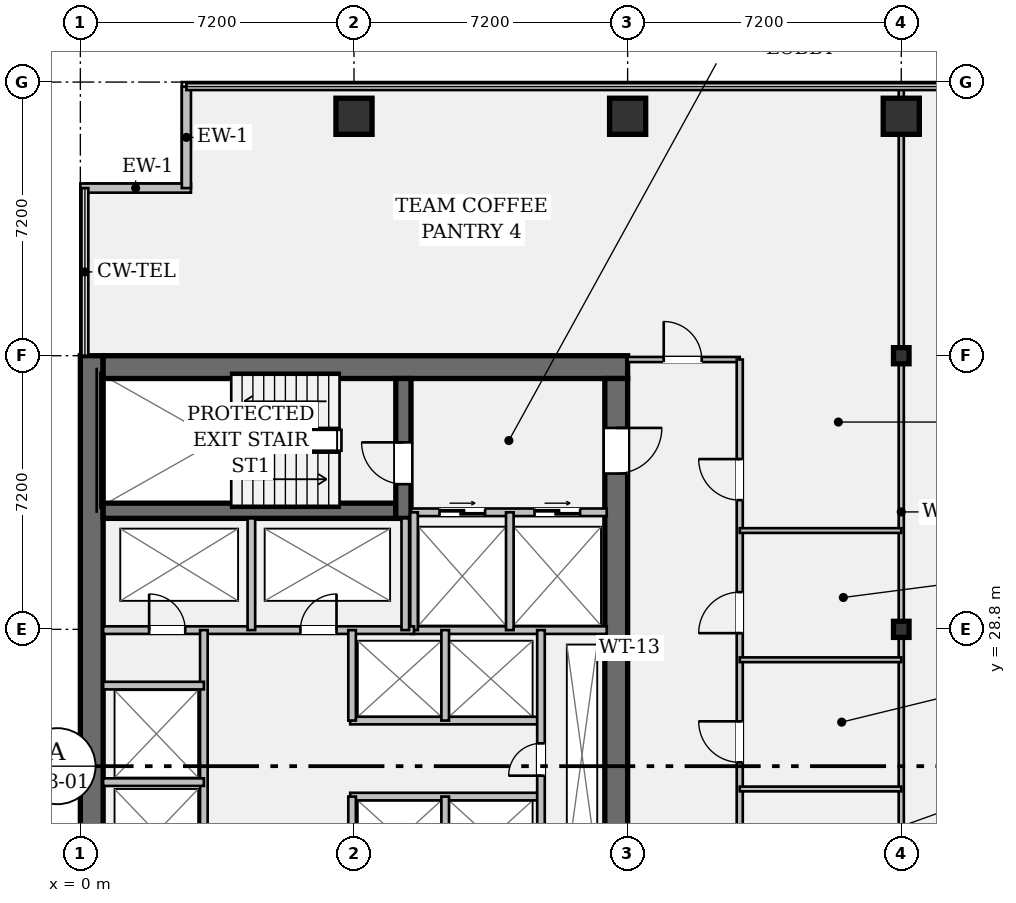
"""IFC4 building model, lengths in metres.
Left out: names, types, materials, properties, quantities, classifications, styles, units other than length and angle.
Written with IfcOpenShell. Run it as: python <this file> out.ifc"""

import sys

from ifc_helpers import new_model, si_unit, direction, frame, frame_2d, origin, origin_2d, place, context, subcontext, project, spatial, rectangle, hollow_rectangle, i_section, extrude, element, fill, save


model = new_model("IFC4")
c1 = context("Model", 3, precision=1e-05, world=origin(), true_north=direction((0.0, 1.0)))
c2 = subcontext(c1, "Body", "Model", "MODEL_VIEW")
j1 = project(units=[si_unit("LENGTHUNIT", "METRE"), si_unit("PLANEANGLEUNIT", "RADIAN")], contexts=[c1])
p1 = place(None, origin())
s1 = spatial("IfcSite", under=j1, at=p1, CompositionType="ELEMENT")
p2 = place(p1, origin())
s2 = spatial("IfcBuilding", under=s1, at=p2, CompositionType="ELEMENT")
p3 = place(p2, frame((0.0, 0.0, 102.2)))
s3 = spatial("IfcBuildingStorey", under=s2, at=p3, CompositionType="ELEMENT", Elevation=102.2)
p4 = place(p3, frame((0.3, 7.2, 0.0), z_axis=(0.0, 0.0, 1.0), x_axis=(0.0, 1.0, 0.0)))
e1 = element("IfcWall", 1, at=p4, inside=s3, PredefinedType="SHEAR", context=c2, shape_type="SweptSolid", body=[
    extrude(rectangle(XDim=28.8, YDim=0.6, at=frame_2d((14.4, 0.0))), origin(), (0.0, 0.0, 1.0), 3.58),
])
p5 = place(p3, frame((0.6, 35.7, 0.0), z_axis=(0.0, 0.0, 1.0), x_axis=(1.0, 0.0, 0.0)))
e2 = element("IfcWall", 2, at=p5, inside=s3, PredefinedType="SHEAR", context=c2, shape_type="SweptSolid", body=[
    extrude(rectangle(XDim=13.8, YDim=0.6, at=frame_2d((6.9, 0.0))), origin(), (0.0, 0.0, 1.0), 3.58),
])
p6 = place(p3, frame((14.1, 35.4, 0.0), z_axis=(0.0, 0.0, 1.0), x_axis=(0.0, -1.0, 0.0)))
e3 = element("IfcWall", 3, at=p6, inside=s3, PredefinedType="SHEAR", context=c2, shape_type="SweptSolid", body=[
    extrude(rectangle(XDim=27.6, YDim=0.6, at=frame_2d((13.8, 0.0))), origin(), (0.0, 0.0, 1.0), 3.58),
])
p7 = place(p6, frame((1.3, 0.0, 0.0)))
e4 = element("IfcOpeningElement", 4, at=p7, cuts=e3, PredefinedType="OPENING", context=c2, shape_type="SweptSolid", body=[
    extrude(rectangle(XDim=1.2, YDim=2.15, at=frame_2d((0.6, 1.075))), frame((0.0, 0.312, 0.0), z_axis=(0.0, -1.0, 0.0), x_axis=(1.0, 0.0, 0.0)), (0.0, 0.0, 1.0), 0.624),
])
p8 = place(p6, frame((25.25, 0.0, 0.0)))
e5 = element("IfcOpeningElement", 5, at=p8, cuts=e3, PredefinedType="OPENING", context=c2, shape_type="SweptSolid", body=[
    extrude(rectangle(XDim=1.2, YDim=2.15, at=frame_2d((0.6, 1.075))), frame((0.0, 0.312, 0.0), z_axis=(0.0, -1.0, 0.0), x_axis=(1.0, 0.0, 0.0)), (0.0, 0.0, 1.0), 0.624),
])
p9 = place(p6, frame((14.6, 0.0, 0.0)))
e6 = element("IfcOpeningElement", 6, at=p9, cuts=e3, PredefinedType="OPENING", context=c2, shape_type="SweptSolid", body=[
    extrude(rectangle(XDim=1.6, YDim=2.2, at=frame_2d((0.8, 1.1))), frame((0.0, 0.312, 0.0), z_axis=(0.0, -1.0, 0.0), x_axis=(1.0, 0.0, 0.0)), (0.0, 0.0, 1.0), 0.624),
])
p10 = place(p3, frame((0.6, 31.92, 0.0), z_axis=(0.0, 0.0, 1.0), x_axis=(1.0, 0.0, 0.0)))
e7 = element("IfcWall", 7, at=p10, inside=s3, PredefinedType="SHEAR", context=c2, shape_type="SweptSolid", body=[
    extrude(rectangle(XDim=7.7, YDim=0.4, at=frame_2d((3.85, 0.0))), origin(), (0.0, 0.0, 1.0), 3.58),
])
p11 = place(p3, frame((8.5, 31.72, 0.0), z_axis=(0.0, 0.0, 1.0), x_axis=(0.0, 1.0, 0.0)))
e8 = element("IfcWall", 8, at=p11, inside=s3, PredefinedType="SHEAR", context=c2, shape_type="SweptSolid", body=[
    extrude(rectangle(XDim=3.68, YDim=0.4, at=frame_2d((1.84, 0.0))), origin(), (0.0, 0.0, 1.0), 3.58),
])
p12 = place(p11, frame((0.9, 0.0, 0.0)))
e9 = element("IfcOpeningElement", 9, at=p12, cuts=e8, PredefinedType="OPENING", context=c2, shape_type="SweptSolid", body=[
    extrude(rectangle(XDim=1.1, YDim=2.15, at=frame_2d((0.55, 1.075))), frame((0.0, 0.212, 0.0), z_axis=(0.0, -1.0, 0.0), x_axis=(1.0, 0.0, 0.0)), (0.0, 0.0, 1.0), 0.424),
])
for number, where, z_axis, x_axis in (
    (10, (7.2, 42.3, 0.0), (0.0, 0.0, 1.0), (1.0, 0.0, 0.0)),
    (11, (14.4, 42.3, 0.0), (0.0, 0.0, 1.0), (1.0, 0.0, 0.0)),
):
    element("IfcColumn", number, at=place(p3, frame(where, z_axis=z_axis, x_axis=x_axis)), inside=s3, PredefinedType="COLUMN", context=c2, shape_type="SweptSolid", body=[
        extrude(hollow_rectangle(XDim=0.95, YDim=0.95, WallThickness=0.06, at=origin_2d()), origin(), (0.0, 0.0, 1.0), 3.58),
    ])
for number, where, z_axis, x_axis in (
    (12, (21.6, 28.8, 0.0), (0.0, 0.0, 1.0), (1.0, 0.0, 0.0)),
    (13, (21.6, 36.0, 0.0), (0.0, 0.0, 1.0), (1.0, 0.0, 0.0)),
):
    element("IfcColumn", number, at=place(p3, frame(where, z_axis=z_axis, x_axis=x_axis)), inside=s3, PredefinedType="COLUMN", context=c2, shape_type="SweptSolid", body=[
        extrude(i_section(OverallWidth=0.409, OverallDepth=0.424, WebThickness=0.033, FlangeThickness=0.052, FilletRadius=0.018, at=origin_2d()), origin(), (0.0, 0.0, 1.0), 3.58),
    ])
p13 = place(p3, frame((21.6, 42.3, 0.0), z_axis=(0.0, 0.0, 1.0), x_axis=(1.0, 0.0, 0.0)))
e14 = element("IfcColumn", 14, at=p13, inside=s3, PredefinedType="COLUMN", context=c2, shape_type="SweptSolid", body=[
    extrude(hollow_rectangle(XDim=0.95, YDim=0.95, WallThickness=0.06, at=origin_2d()), origin(), (0.0, 0.0, 1.0), 3.58),
])
p14 = place(p3, frame((0.0, 40.41, 0.0), z_axis=(0.0, 0.0, 1.0), x_axis=(1.0, 0.0, 0.0)))
e15 = element("IfcWall", 15, at=p14, inside=s3, PredefinedType="STANDARD", context=c2, shape_type="SweptSolid", body=[
    extrude(rectangle(XDim=2.91, YDim=0.24, at=frame_2d((1.455, 0.0))), origin(), (0.0, 0.0, 1.0), 3.58),
])
p15 = place(p3, frame((2.79, 40.41, 0.0), z_axis=(0.0, 0.0, 1.0), x_axis=(0.0, 1.0, 0.0)))
e16 = element("IfcWall", 16, at=p15, inside=s3, PredefinedType="STANDARD", context=c2, shape_type="SweptSolid", body=[
    extrude(rectangle(XDim=2.67, YDim=0.24, at=frame_2d((1.335, 0.0))), origin(), (0.0, 0.0, 1.0), 3.58),
])
p16 = place(p3, frame((8.7, 31.88, 0.0), z_axis=(0.0, 0.0, 1.0), x_axis=(1.0, 0.0, 0.0)))
e17 = element("IfcWall", 17, at=p16, inside=s3, PredefinedType="PARTITIONING", context=c2, shape_type="SweptSolid", body=[
    extrude(rectangle(XDim=5.15, YDim=0.2, at=frame_2d((2.575, 0.0))), origin(), (0.0, 0.0, 1.0), 3.58),
])
p17 = place(p16, frame((0.75, 0.0, 0.0)))
e18 = element("IfcOpeningElement", 18, at=p17, cuts=e17, PredefinedType="OPENING", context=c2, shape_type="SweptSolid", body=[
    extrude(rectangle(XDim=1.2, YDim=2.2, at=frame_2d((0.6, 1.1))), frame((0.0, 0.112, 0.0), z_axis=(0.0, -1.0, 0.0), x_axis=(1.0, 0.0, 0.0)), (0.0, 0.0, 1.0), 0.224),
])
p18 = place(p16, frame((3.25, 0.0, 0.0)))
e19 = element("IfcOpeningElement", 19, at=p18, cuts=e17, PredefinedType="OPENING", context=c2, shape_type="SweptSolid", body=[
    extrude(rectangle(XDim=1.2, YDim=2.2, at=frame_2d((0.6, 1.1))), frame((0.0, 0.112, 0.0), z_axis=(0.0, -1.0, 0.0), x_axis=(1.0, 0.0, 0.0)), (0.0, 0.0, 1.0), 0.224),
])
p19 = place(p3, frame((8.7, 28.78, 0.0), z_axis=(0.0, 0.0, 1.0), x_axis=(1.0, 0.0, 0.0)))
e20 = element("IfcWall", 20, at=p19, inside=s3, PredefinedType="PARTITIONING", context=c2, shape_type="SweptSolid", body=[
    extrude(rectangle(XDim=5.15, YDim=0.2, at=frame_2d((2.575, 0.0))), origin(), (0.0, 0.0, 1.0), 3.58),
])
for number, where, z_axis, x_axis in (
    (21, (8.78, 28.78, 0.0), (0.0, 0.0, 1.0), (0.0, 1.0, 0.0)),
    (22, (11.3, 28.78, 0.0), (0.0, 0.0, 1.0), (0.0, 1.0, 0.0)),
):
    element("IfcWall", number, at=place(p3, frame(where, z_axis=z_axis, x_axis=x_axis)), inside=s3, PredefinedType="PARTITIONING", context=c2, shape_type="SweptSolid", body=[
        extrude(rectangle(XDim=3.1, YDim=0.2, at=frame_2d((1.55, 0.0))), origin(), (0.0, 0.0, 1.0), 3.58),
    ])
p20 = place(p3, frame((0.6, 28.78, 0.0), z_axis=(0.0, 0.0, 1.0), x_axis=(1.0, 0.0, 0.0)))
e23 = element("IfcWall", 23, at=p20, inside=s3, PredefinedType="PARTITIONING", context=c2, shape_type="SweptSolid", body=[
    extrude(rectangle(XDim=8.18, YDim=0.2, at=frame_2d((4.09, 0.0))), origin(), (0.0, 0.0, 1.0), 3.58),
])
p21 = place(p20, frame((1.21, 0.0, 0.0)))
e24 = element("IfcOpeningElement", 24, at=p21, cuts=e23, PredefinedType="OPENING", context=c2, shape_type="SweptSolid", body=[
    extrude(rectangle(XDim=0.95, YDim=2.15, at=frame_2d((0.475, 1.075))), frame((0.0, 0.112, 0.0), z_axis=(0.0, -1.0, 0.0), x_axis=(1.0, 0.0, 0.0)), (0.0, 0.0, 1.0), 0.224),
])
p22 = place(p20, frame((5.19, 0.0, 0.0)))
e25 = element("IfcOpeningElement", 25, at=p22, cuts=e23, PredefinedType="OPENING", context=c2, shape_type="SweptSolid", body=[
    extrude(rectangle(XDim=0.95, YDim=2.15, at=frame_2d((0.475, 1.075))), frame((0.0, 0.112, 0.0), z_axis=(0.0, -1.0, 0.0), x_axis=(1.0, 0.0, 0.0)), (0.0, 0.0, 1.0), 0.224),
])
for number, where, z_axis, x_axis in (
    (26, (4.5, 28.78, 0.0), (0.0, 0.0, 1.0), (0.0, 1.0, 0.0)),
    (27, (8.55, 28.78, 0.0), (0.0, 0.0, 1.0), (0.0, 1.0, 0.0)),
):
    element("IfcWall", number, at=place(p3, frame(where, z_axis=z_axis, x_axis=x_axis)), inside=s3, PredefinedType="PARTITIONING", context=c2, shape_type="SweptSolid", body=[
        extrude(rectangle(XDim=2.94, YDim=0.2, at=frame_2d((1.47, 0.0))), origin(), (0.0, 0.0, 1.0), 3.58),
    ])
p23 = place(p3, frame((3.25, 15.7, 0.0), z_axis=(0.0, 0.0, 1.0), x_axis=(0.0, 1.0, 0.0)))
e28 = element("IfcWall", 28, at=p23, inside=s3, PredefinedType="PARTITIONING", context=c2, shape_type="SweptSolid", body=[
    extrude(rectangle(XDim=13.08, YDim=0.2, at=frame_2d((6.54, 0.0))), origin(), (0.0, 0.0, 1.0), 3.58),
])
for number, where, z_axis, x_axis in (
    (29, (0.6, 24.78, 0.0), (0.0, 0.0, 1.0), (1.0, 0.0, 0.0)),
    (30, (0.6, 27.32, 0.0), (0.0, 0.0, 1.0), (1.0, 0.0, 0.0)),
):
    element("IfcWall", number, at=place(p3, frame(where, z_axis=z_axis, x_axis=x_axis)), inside=s3, PredefinedType="PARTITIONING", context=c2, shape_type="SweptSolid", body=[
        extrude(rectangle(XDim=2.65, YDim=0.2, at=frame_2d((1.325, 0.0))), origin(), (0.0, 0.0, 1.0), 3.58),
    ])
for number, where, z_axis, x_axis in (
    (31, (7.1, 24.4, 0.0), (0.0, 0.0, 1.0), (1.0, 0.0, 0.0)),
    (32, (7.1, 26.4, 0.0), (0.0, 0.0, 1.0), (1.0, 0.0, 0.0)),
):
    element("IfcWall", number, at=place(p3, frame(where, z_axis=z_axis, x_axis=x_axis)), inside=s3, PredefinedType="PARTITIONING", context=c2, shape_type="SweptSolid", body=[
        extrude(rectangle(XDim=5.02, YDim=0.2, at=frame_2d((2.51, 0.0))), origin(), (0.0, 0.0, 1.0), 3.58),
    ])
p24 = place(p3, frame((7.15, 22.2, 0.0), z_axis=(0.0, 0.0, 1.0), x_axis=(0.0, 1.0, 0.0)))
e33 = element("IfcWall", 33, at=p24, inside=s3, PredefinedType="PARTITIONING", context=c2, shape_type="SweptSolid", body=[
    extrude(rectangle(XDim=2.2, YDim=0.2, at=frame_2d((1.1, 0.0))), origin(), (0.0, 0.0, 1.0), 3.58),
])
p25 = place(p3, frame((7.15, 26.4, 0.0), z_axis=(0.0, 0.0, 1.0), x_axis=(0.0, 1.0, 0.0)))
e34 = element("IfcWall", 34, at=p25, inside=s3, PredefinedType="PARTITIONING", context=c2, shape_type="SweptSolid", body=[
    extrude(rectangle(XDim=2.38, YDim=0.2, at=frame_2d((1.19, 0.0))), origin(), (0.0, 0.0, 1.0), 3.58),
])
p26 = place(p3, frame((9.6, 22.2, 0.0), z_axis=(0.0, 0.0, 1.0), x_axis=(0.0, 1.0, 0.0)))
e35 = element("IfcWall", 35, at=p26, inside=s3, PredefinedType="PARTITIONING", context=c2, shape_type="SweptSolid", body=[
    extrude(rectangle(XDim=2.2, YDim=0.2, at=frame_2d((1.1, 0.0))), origin(), (0.0, 0.0, 1.0), 3.58),
])
p27 = place(p3, frame((9.6, 26.4, 0.0), z_axis=(0.0, 0.0, 1.0), x_axis=(0.0, 1.0, 0.0)))
e36 = element("IfcWall", 36, at=p27, inside=s3, PredefinedType="PARTITIONING", context=c2, shape_type="SweptSolid", body=[
    extrude(rectangle(XDim=2.38, YDim=0.2, at=frame_2d((1.19, 0.0))), origin(), (0.0, 0.0, 1.0), 3.58),
])
p28 = place(p3, frame((12.12, 22.2, 0.0), z_axis=(0.0, 0.0, 1.0), x_axis=(0.0, 1.0, 0.0)))
e37 = element("IfcWall", 37, at=p28, inside=s3, PredefinedType="PARTITIONING", context=c2, shape_type="SweptSolid", body=[
    extrude(rectangle(XDim=6.58, YDim=0.2, at=frame_2d((3.29, 0.0))), origin(), (0.0, 0.0, 1.0), 3.58),
])
p29 = place(p28, frame((2.75, 0.0, 0.0)))
e38 = element("IfcOpeningElement", 38, at=p29, cuts=e37, PredefinedType="OPENING", context=c2, shape_type="SweptSolid", body=[
    extrude(rectangle(XDim=0.85, YDim=2.15, at=frame_2d((0.425, 1.075))), frame((0.0, 0.112, 0.0), z_axis=(0.0, -1.0, 0.0), x_axis=(1.0, 0.0, 0.0)), (0.0, 0.0, 1.0), 0.224),
])
p30 = place(p3, frame((14.4, 35.9, 0.0), z_axis=(0.0, 0.0, 1.0), x_axis=(1.0, 0.0, 0.0)))
e39 = element("IfcWall", 39, at=p30, inside=s3, PredefinedType="PARTITIONING", context=c2, shape_type="SweptSolid", body=[
    extrude(rectangle(XDim=2.95, YDim=0.135, at=frame_2d((1.475, 0.0))), origin(), (0.0, 0.0, 1.0), 2.793),
])
p31 = place(p30, frame((0.95, 0.0, 0.0)))
e40 = element("IfcOpeningElement", 40, at=p31, cuts=e39, PredefinedType="OPENING", context=c2, shape_type="SweptSolid", body=[
    extrude(rectangle(XDim=1.0, YDim=2.15, at=frame_2d((0.5, 1.075))), frame((0.0, 0.08, 0.0), z_axis=(0.0, -1.0, 0.0), x_axis=(1.0, 0.0, 0.0)), (0.0, 0.0, 1.0), 0.159),
])
p32 = place(p3, frame((17.35, 20.7, 0.0), z_axis=(0.0, 0.0, 1.0), x_axis=(0.0, 1.0, 0.0)))
e41 = element("IfcWall", 41, at=p32, inside=s3, PredefinedType="PARTITIONING", context=c2, shape_type="SweptSolid", body=[
    extrude(rectangle(XDim=15.2, YDim=0.16, at=frame_2d((7.6, 0.0))), origin(), (0.0, 0.0, 1.0), 2.793),
])
p33 = place(p32, frame((1.4, 0.0, 0.0)))
e42 = element("IfcOpeningElement", 42, at=p33, cuts=e41, PredefinedType="OPENING", context=c2, shape_type="SweptSolid", body=[
    extrude(rectangle(XDim=1.08, YDim=2.15, at=frame_2d((0.54, 1.075))), frame((0.0, 0.092, 0.0), z_axis=(0.0, -1.0, 0.0), x_axis=(1.0, 0.0, 0.0)), (0.0, 0.0, 1.0), 0.184),
])
p34 = place(p32, frame((4.6, 0.0, 0.0)))
e43 = element("IfcOpeningElement", 43, at=p34, cuts=e41, PredefinedType="OPENING", context=c2, shape_type="SweptSolid", body=[
    extrude(rectangle(XDim=1.08, YDim=2.15, at=frame_2d((0.54, 1.075))), frame((0.0, 0.092, 0.0), z_axis=(0.0, -1.0, 0.0), x_axis=(1.0, 0.0, 0.0)), (0.0, 0.0, 1.0), 0.184),
])
p35 = place(p32, frame((8.0, 0.0, 0.0)))
e44 = element("IfcOpeningElement", 44, at=p35, cuts=e41, PredefinedType="OPENING", context=c2, shape_type="SweptSolid", body=[
    extrude(rectangle(XDim=1.08, YDim=2.15, at=frame_2d((0.54, 1.075))), frame((0.0, 0.092, 0.0), z_axis=(0.0, -1.0, 0.0), x_axis=(1.0, 0.0, 0.0)), (0.0, 0.0, 1.0), 0.184),
])
p36 = place(p32, frame((11.5, 0.0, 0.0)))
e45 = element("IfcOpeningElement", 45, at=p36, cuts=e41, PredefinedType="OPENING", context=c2, shape_type="SweptSolid", body=[
    extrude(rectangle(XDim=1.08, YDim=2.15, at=frame_2d((0.54, 1.075))), frame((0.0, 0.092, 0.0), z_axis=(0.0, -1.0, 0.0), x_axis=(1.0, 0.0, 0.0)), (0.0, 0.0, 1.0), 0.184),
])
p37 = place(p3, frame((21.6, 20.7, 0.0), z_axis=(0.0, 0.0, 1.0), x_axis=(0.0, 1.0, 0.0)))
e46 = element("IfcWall", 46, at=p37, inside=s3, PredefinedType="PARTITIONING", context=c2, shape_type="SweptSolid", body=[
    extrude(rectangle(XDim=22.38, YDim=0.135, at=frame_2d((11.19, 0.0))), origin(), (0.0, 0.0, 1.0), 2.793),
])
for number, where, z_axis, x_axis in (
    (47, (17.35, 24.6, 0.0), (0.0, 0.0, 1.0), (1.0, 0.0, 0.0)),
    (48, (17.35, 28.0, 0.0), (0.0, 0.0, 1.0), (1.0, 0.0, 0.0)),
    (49, (17.35, 31.4, 0.0), (0.0, 0.0, 1.0), (1.0, 0.0, 0.0)),
):
    element("IfcWall", number, at=place(p3, frame(where, z_axis=z_axis, x_axis=x_axis)), inside=s3, PredefinedType="PARTITIONING", context=c2, shape_type="SweptSolid", body=[
        extrude(rectangle(XDim=4.25, YDim=0.125, at=frame_2d((2.125, 0.0))), origin(), (0.0, 0.0, 1.0), 2.793),
    ])
p38 = place(p12, origin())
e50 = element("IfcDoor", 50, at=p38, inside=s3, OperationType="SINGLE_SWING_RIGHT", PredefinedType="DOOR", context=c2, shape_type="SweptSolid", body=[
    extrude(rectangle(XDim=1.1, YDim=2.15, at=frame_2d((0.55, 1.075))), frame((0.0, 0.025, 0.0), z_axis=(0.0, -1.0, 0.0), x_axis=(1.0, 0.0, 0.0)), (0.0, 0.0, 1.0), 0.05),
])
fill(e9, e50)
p39 = place(p7, origin())
e51 = element("IfcDoor", 51, at=p39, inside=s3, OperationType="SINGLE_SWING_LEFT", PredefinedType="DOOR", context=c2, shape_type="SweptSolid", body=[
    extrude(rectangle(XDim=1.2, YDim=2.15, at=frame_2d((0.6, 1.075))), frame((0.0, 0.025, 0.0), z_axis=(0.0, -1.0, 0.0), x_axis=(1.0, 0.0, 0.0)), (0.0, 0.0, 1.0), 0.05),
])
fill(e4, e51)
p40 = place(p17, origin())
e52 = element("IfcDoor", 52, at=p40, inside=s3, OperationType="DOUBLE_DOOR_SLIDING", PredefinedType="DOOR", context=c2, shape_type="SweptSolid", body=[
    extrude(rectangle(XDim=1.2, YDim=2.2, at=frame_2d((0.6, 1.1))), frame((0.0, 0.025, 0.0), z_axis=(0.0, -1.0, 0.0), x_axis=(1.0, 0.0, 0.0)), (0.0, 0.0, 1.0), 0.05),
])
fill(e18, e52)
p41 = place(p18, origin())
e53 = element("IfcDoor", 53, at=p41, inside=s3, OperationType="DOUBLE_DOOR_SLIDING", PredefinedType="DOOR", context=c2, shape_type="SweptSolid", body=[
    extrude(rectangle(XDim=1.2, YDim=2.2, at=frame_2d((0.6, 1.1))), frame((0.0, 0.025, 0.0), z_axis=(0.0, -1.0, 0.0), x_axis=(1.0, 0.0, 0.0)), (0.0, 0.0, 1.0), 0.05),
])
fill(e19, e53)
p42 = place(p21, origin())
e54 = element("IfcDoor", 54, at=p42, inside=s3, OperationType="SINGLE_SWING_LEFT", PredefinedType="DOOR", context=c2, shape_type="SweptSolid", body=[
    extrude(rectangle(XDim=0.95, YDim=2.15, at=frame_2d((0.475, 1.075))), frame((0.0, 0.025, 0.0), z_axis=(0.0, -1.0, 0.0), x_axis=(1.0, 0.0, 0.0)), (0.0, 0.0, 1.0), 0.05),
])
fill(e24, e54)
p43 = place(p22, origin())
e55 = element("IfcDoor", 55, at=p43, inside=s3, OperationType="SINGLE_SWING_RIGHT", PredefinedType="DOOR", context=c2, shape_type="SweptSolid", body=[
    extrude(rectangle(XDim=0.95, YDim=2.15, at=frame_2d((0.475, 1.075))), frame((0.0, 0.025, 0.0), z_axis=(0.0, -1.0, 0.0), x_axis=(1.0, 0.0, 0.0)), (0.0, 0.0, 1.0), 0.05),
])
fill(e25, e55)
p44 = place(p29, origin())
e56 = element("IfcDoor", 56, at=p44, inside=s3, OperationType="SINGLE_SWING_LEFT", PredefinedType="DOOR", context=c2, shape_type="SweptSolid", body=[
    extrude(rectangle(XDim=0.85, YDim=2.15, at=frame_2d((0.425, 1.075))), frame((0.0, 0.025, 0.0), z_axis=(0.0, -1.0, 0.0), x_axis=(1.0, 0.0, 0.0)), (0.0, 0.0, 1.0), 0.05),
])
fill(e38, e56)
p45 = place(p34, origin())
e57 = element("IfcDoor", 57, at=p45, inside=s3, OperationType="SINGLE_SWING_RIGHT", PredefinedType="DOOR", context=c2, shape_type="SweptSolid", body=[
    extrude(rectangle(XDim=1.08, YDim=2.15, at=frame_2d((0.54, 1.075))), frame((0.0, 0.025, 0.0), z_axis=(0.0, -1.0, 0.0), x_axis=(1.0, 0.0, 0.0)), (0.0, 0.0, 1.0), 0.05),
])
fill(e43, e57)
p46 = place(p35, origin())
e58 = element("IfcDoor", 58, at=p46, inside=s3, OperationType="SINGLE_SWING_LEFT", PredefinedType="DOOR", context=c2, shape_type="SweptSolid", body=[
    extrude(rectangle(XDim=1.08, YDim=2.15, at=frame_2d((0.54, 1.075))), frame((0.0, 0.025, 0.0), z_axis=(0.0, -1.0, 0.0), x_axis=(1.0, 0.0, 0.0)), (0.0, 0.0, 1.0), 0.05),
])
fill(e44, e58)
p47 = place(p36, origin())
e59 = element("IfcDoor", 59, at=p47, inside=s3, OperationType="SINGLE_SWING_RIGHT", PredefinedType="DOOR", context=c2, shape_type="SweptSolid", body=[
    extrude(rectangle(XDim=1.08, YDim=2.15, at=frame_2d((0.54, 1.075))), frame((0.0, 0.025, 0.0), z_axis=(0.0, -1.0, 0.0), x_axis=(1.0, 0.0, 0.0)), (0.0, 0.0, 1.0), 0.05),
])
fill(e45, e59)
p48 = place(p31, origin())
e60 = element("IfcDoor", 60, at=p48, inside=s3, OperationType="SINGLE_SWING_LEFT", PredefinedType="DOOR", context=c2, shape_type="SweptSolid", body=[
    extrude(rectangle(XDim=1.0, YDim=2.15, at=frame_2d((0.5, 1.075))), frame((0.0, 0.025, 0.0), z_axis=(0.0, -1.0, 0.0), x_axis=(1.0, 0.0, 0.0)), (0.0, 0.0, 1.0), 0.05),
])
fill(e40, e60)
save(model, sys.argv[1])
